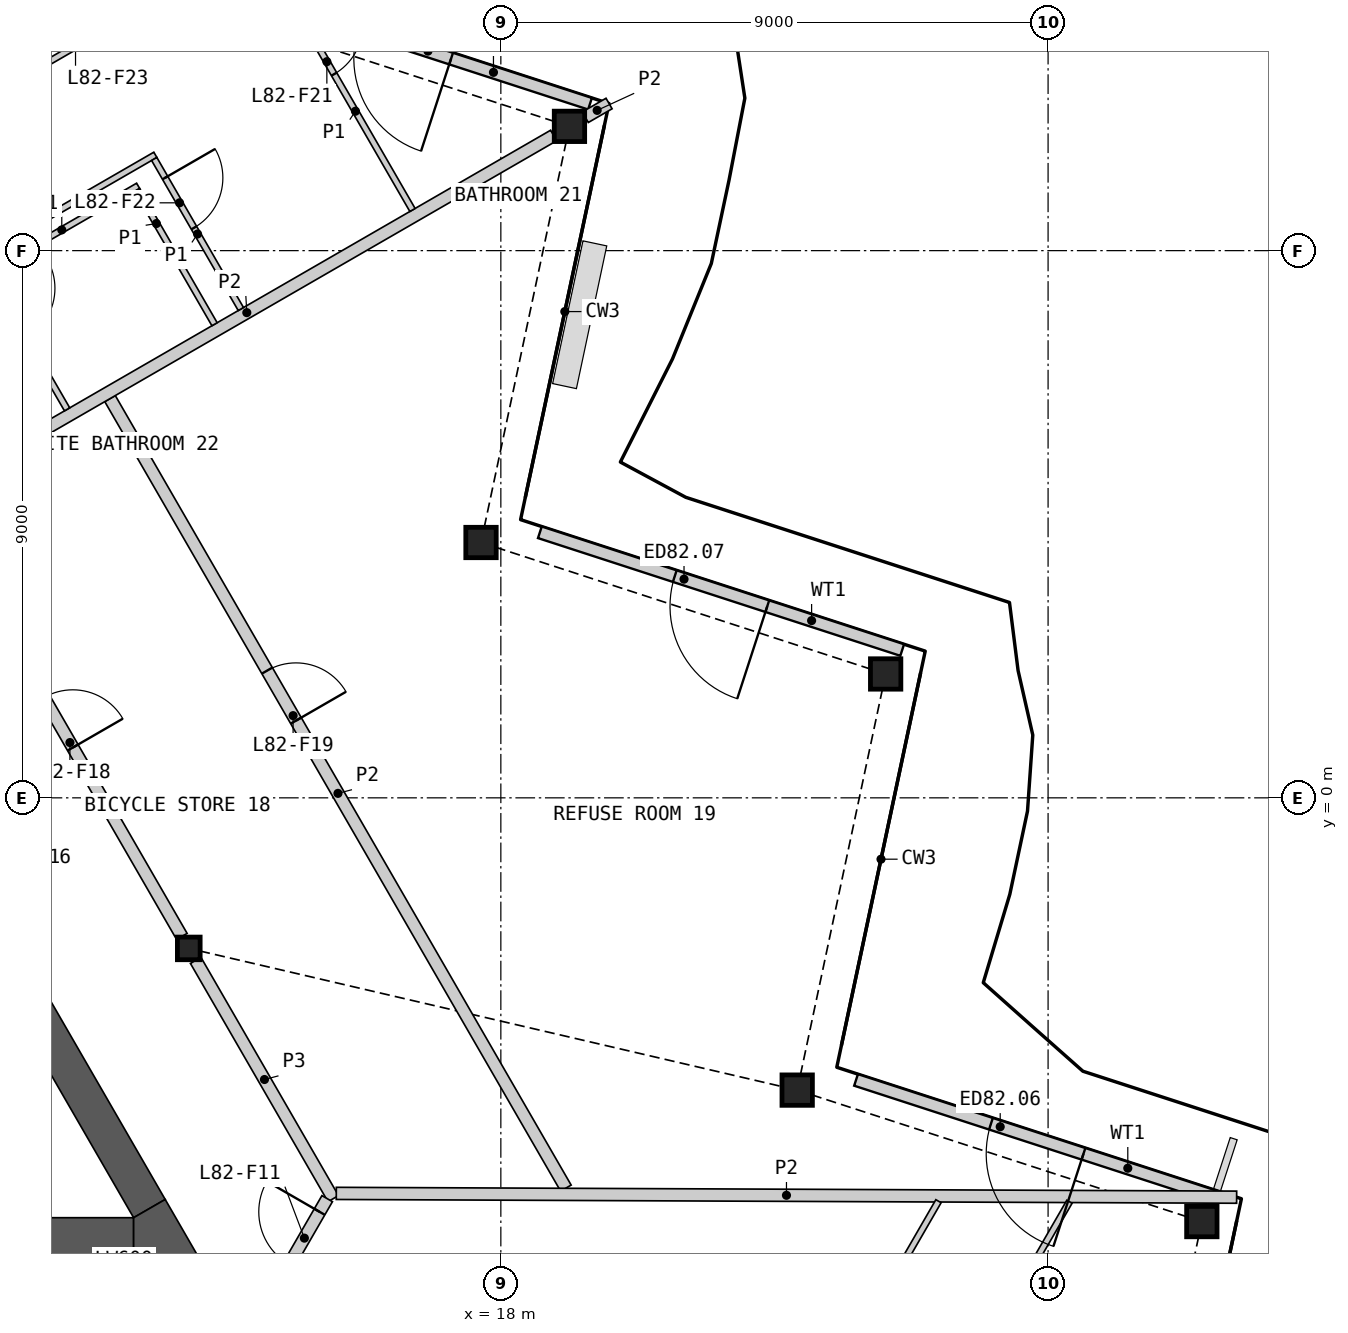
"""IFC4 building model, lengths in metres.
Left out: names, types, materials, properties, quantities, classifications, styles, units other than length and angle.
Written with IfcOpenShell. Run it as: python <this file> out.ifc"""

import sys

from ifc_helpers import new_model, si_unit, direction, frame, frame_2d, origin, origin_2d, place, context, subcontext, project, spatial, polyline, rectangle, hollow_rectangle, i_section, outline, extrude, element, fill, save


model = new_model("IFC4")
c1 = context("Model", 3, precision=1e-05, world=origin(), true_north=direction((0.0, 1.0)))
c2 = subcontext(c1, "Body", "Model", "MODEL_VIEW")
j1 = project(units=[si_unit("LENGTHUNIT", "METRE"), si_unit("PLANEANGLEUNIT", "RADIAN")], contexts=[c1])
p1 = place(None, origin())
s1 = spatial("IfcSite", under=j1, at=p1, CompositionType="ELEMENT")
p2 = place(p1, origin())
s2 = spatial("IfcBuilding", under=s1, at=p2, CompositionType="ELEMENT")
p3 = place(p2, frame((0.0, 0.0, 367.8)))
s3 = spatial("IfcBuildingStorey", under=s2, at=p3, CompositionType="ELEMENT", Elevation=367.8)
for number, where, z_axis, x_axis in (
    (1, (29.529, -6.969, 0.0), (0.0, 0.0, 1.0), (1.0, 0.0, 0.0)),
    (2, (22.874, -4.807, 0.0), (0.0, 0.0, 1.0), (1.0, 0.0, 0.0)),
    (3, (24.329, 2.037, 0.0), (0.0, 0.0, 1.0), (1.0, 0.0, 0.0)),
    (4, (17.674, 4.199, 0.0), (0.0, 0.0, 1.0), (1.0, 0.0, 0.0)),
    (5, (19.129, 11.044, 0.0), (0.0, 0.0, 1.0), (1.0, 0.0, 0.0)),
):
    element("IfcColumn", number, at=place(p3, frame(where, z_axis=z_axis, x_axis=x_axis)), inside=s3, PredefinedType="COLUMN", context=c2, shape_type="SweptSolid", body=[
        extrude(hollow_rectangle(XDim=0.5, YDim=0.5, WallThickness=0.03, at=origin_2d()), origin(), (0.0, 0.0, 1.0), 3.4),
    ])
p4 = place(p3, frame((12.868, -2.476, 0.0), z_axis=(0.0, 0.0, 1.0), x_axis=(1.0, 0.0, 0.0)))
e6 = element("IfcColumn", 6, at=p4, inside=s3, PredefinedType="COLUMN", context=c2, shape_type="SweptSolid", body=[
    extrude(i_section(OverallWidth=0.374, OverallDepth=0.372, WebThickness=0.016, FlangeThickness=0.026, at=origin_2d()), origin(), (0.0, 0.0, 1.0), 3.4),
])
p5 = place(p3, frame((29.801, -6.576, 0.0), z_axis=(0.0, 0.0, 1.0), x_axis=(-0.951060123915, 0.309005891041, 0.0)))
e7 = element("IfcWall", 7, at=p5, inside=s3, PredefinedType="SOLIDWALL", context=c2, shape_type="SweptSolid", body=[
    extrude(rectangle(XDim=6.265, YDim=0.2, at=frame_2d((3.133, 0.0))), origin(), (0.0, 0.0, 1.0), 2.634),
])
p6 = place(p5, frame((2.333, 0.0, 0.0)))
e8 = element("IfcOpeningElement", 8, at=p6, cuts=e7, PredefinedType="OPENING", context=c2, shape_type="SweptSolid", body=[
    extrude(rectangle(XDim=1.6, YDim=2.25, at=frame_2d((0.8, 1.125))), frame((0.0, 0.11, 0.0), z_axis=(0.0, -1.0, 0.0), x_axis=(1.0, 0.0, 0.0)), (0.0, 0.0, 1.0), 0.22),
])
p7 = place(p3, frame((24.601, 2.431, 0.0), z_axis=(0.0, 0.0, 1.0), x_axis=(-0.951060123915, 0.309005891041, 0.0)))
e9 = element("IfcWall", 9, at=p7, inside=s3, PredefinedType="SOLIDWALL", context=c2, shape_type="SweptSolid", body=[
    extrude(rectangle(XDim=6.265, YDim=0.2, at=frame_2d((3.133, 0.0))), origin(), (0.0, 0.0, 1.0), 2.634),
])
p8 = place(p7, frame((2.333, 0.0, 0.0)))
e10 = element("IfcOpeningElement", 10, at=p8, cuts=e9, PredefinedType="OPENING", context=c2, shape_type="SweptSolid", body=[
    extrude(rectangle(XDim=1.6, YDim=2.25, at=frame_2d((0.8, 1.125))), frame((0.0, 0.11, 0.0), z_axis=(0.0, -1.0, 0.0), x_axis=(1.0, 0.0, 0.0)), (0.0, 0.0, 1.0), 0.22),
])
p9 = place(p3, frame((19.467, 11.416, 0.0), z_axis=(0.0, 0.0, 1.0), x_axis=(-0.951057706878, 0.309013330114, 0.0)))
e11 = element("IfcWall", 11, at=p9, inside=s3, PredefinedType="SOLIDWALL", context=c2, shape_type="SweptSolid", body=[
    extrude(rectangle(XDim=6.678, YDim=0.2, at=frame_2d((3.339, 0.0))), origin(), (0.0, 0.0, 1.0), 2.634),
])
p10 = place(p9, frame((2.402, 0.0, 0.0)))
e12 = element("IfcOpeningElement", 12, at=p10, cuts=e11, PredefinedType="OPENING", context=c2, shape_type="SweptSolid", body=[
    extrude(rectangle(XDim=1.6, YDim=2.25, at=frame_2d((0.8, 1.125))), frame((0.0, 0.11, 0.0), z_axis=(0.0, -1.0, 0.0), x_axis=(1.0, 0.0, 0.0)), (0.0, 0.0, 1.0), 0.22),
])
p11 = place(p3, frame((-11.961, -7.206, 0.0), z_axis=(0.0, 0.0, 1.0), x_axis=(1.0, 0.0, 0.0)))
e13 = element("IfcWall", 13, at=p11, inside=s3, PredefinedType="SHEAR", context=c2, shape_type="SweptSolid", body=[
    extrude(rectangle(XDim=23.921, YDim=0.6, at=frame_2d((11.961, 0.0))), origin(), (0.0, 0.0, 1.0), 3.1),
])
p12 = place(p3, frame((12.221, -6.756, 0.0), z_axis=(0.0, 0.0, 1.0), x_axis=(-0.50000604952, 0.866021911064, 0.0)))
e14 = element("IfcWall", 14, at=p12, inside=s3, PredefinedType="SHEAR", context=c2, shape_type="SweptSolid", body=[
    extrude(rectangle(XDim=4.869, YDim=0.6, at=frame_2d((2.434, 0.0))), origin(), (0.0, 0.0, 1.0), 3.1),
])
p13 = place(p3, origin())
e15 = element("IfcWall", 15, at=p13, inside=s3, PredefinedType="SHEAR", context=c2, shape_type="SweptSolid", body=[
    extrude(outline(polyline([(11.961, -7.506), (11.961, -6.906), (12.48, -6.606), (13.0, -7.506), (11.961, -7.506)])), origin(), (0.0, 0.0, 1.0), 3.1),
])
p14 = place(p3, frame((8.692, 4.756, 0.0), z_axis=(0.0, 0.0, 1.0), x_axis=(0.500001682468, -0.866024432409, 0.0)))
e16 = element("IfcWall", 16, at=p14, inside=s3, PredefinedType="PARTITIONING", context=c2, shape_type="SweptSolid", body=[
    extrude(rectangle(XDim=8.124, YDim=0.2, at=frame_2d((4.062, 0.0))), origin(), (0.0, 0.0, 1.0), 3.1),
])
p15 = place(p14, frame((3.587, 0.0, 0.0)))
e17 = element("IfcOpeningElement", 17, at=p15, cuts=e16, PredefinedType="OPENING", context=c2, shape_type="SweptSolid", body=[
    extrude(rectangle(XDim=0.95, YDim=2.1, at=frame_2d((0.475, 1.05))), frame((0.0, 0.11, 0.0), z_axis=(0.0, -1.0, 0.0), x_axis=(1.0, 0.0, 0.0)), (0.0, 0.0, 1.0), 0.22),
])
p16 = place(p3, frame((12.981, -2.673, 0.0), z_axis=(0.0, 0.0, 1.0), x_axis=(0.499974648164, -0.866040040179, 0.0)))
e18 = element("IfcWall", 18, at=p16, inside=s3, PredefinedType="PARTITIONING", context=c2, shape_type="SweptSolid", body=[
    extrude(rectangle(XDim=4.525, YDim=0.2, at=frame_2d((2.263, 0.0))), origin(), (0.0, 0.0, 1.0), 3.1),
])
p17 = place(p3, frame((13.293, -9.797, 0.0), z_axis=(0.0, 0.0, 1.0), x_axis=(0.499977520935, 0.86603838169, 0.0)))
e19 = element("IfcWall", 19, at=p17, inside=s3, PredefinedType="PARTITIONING", context=c2, shape_type="SweptSolid", body=[
    extrude(rectangle(XDim=3.701, YDim=0.2, at=frame_2d((1.851, 0.0))), origin(), (0.0, 0.0, 1.0), 3.1),
])
p18 = place(p17, frame((2.451, 0.0, 0.0)))
e20 = element("IfcOpeningElement", 20, at=p18, cuts=e19, PredefinedType="OPENING", context=c2, shape_type="SweptSolid", body=[
    extrude(rectangle(XDim=1.0, YDim=2.1, at=frame_2d((0.5, 1.05))), frame((0.0, 0.11, 0.0), z_axis=(0.0, -1.0, 0.0), x_axis=(1.0, 0.0, 0.0)), (0.0, 0.0, 1.0), 0.22),
])
p19 = place(p3, frame((11.573, 6.566, 0.0), z_axis=(0.0, 0.0, 1.0), x_axis=(0.499993542657, -0.866029131901, 0.0)))
e21 = element("IfcWall", 21, at=p19, inside=s3, PredefinedType="PARTITIONING", context=c2, shape_type="SweptSolid", body=[
    extrude(rectangle(XDim=14.994, YDim=0.2, at=frame_2d((7.497, 0.0))), origin(), (0.0, 0.0, 1.0), 2.33),
])
p20 = place(p19, frame((5.166, 0.0, 0.0)))
e22 = element("IfcOpeningElement", 22, at=p20, cuts=e21, PredefinedType="OPENING", context=c2, shape_type="SweptSolid", body=[
    extrude(rectangle(XDim=0.95, YDim=2.1, at=frame_2d((0.475, 1.05))), frame((0.0, 0.11, 0.0), z_axis=(0.0, -1.0, 0.0), x_axis=(1.0, 0.0, 0.0)), (0.0, 0.0, 1.0), 0.22),
])
p21 = place(p3, frame((15.294, -6.506, 0.0), z_axis=(0.0, 0.0, 1.0), x_axis=(0.99999116141, -0.004204414611, 0.0)))
e23 = element("IfcWall", 23, at=p21, inside=s3, PredefinedType="PARTITIONING", context=c2, shape_type="SweptSolid", body=[
    extrude(rectangle(XDim=14.807, YDim=0.2, at=frame_2d((7.404, 0.0))), origin(), (0.0, 0.0, 1.0), 2.33),
])
p22 = place(p3, frame((8.775, 5.066, 0.0), z_axis=(0.0, 0.0, 1.0), x_axis=(0.866023724155, 0.500002909193, 0.0)))
e24 = element("IfcWall", 24, at=p22, inside=s3, PredefinedType="PARTITIONING", context=c2, shape_type="SweptSolid", body=[
    extrude(rectangle(XDim=11.655, YDim=0.2, at=frame_2d((5.827, 0.0))), origin(), (0.0, 0.0, 1.0), 2.33),
])
p23 = place(p3, frame((19.389, 11.194, 0.0), z_axis=(0.0, 0.0, 1.0), x_axis=(0.866104518135, 0.499862944882, 0.0)))
e25 = element("IfcWall", 25, at=p23, inside=s3, PredefinedType="PARTITIONING", context=c2, shape_type="SweptSolid", body=[
    extrude(rectangle(XDim=0.451, YDim=0.2, at=frame_2d((0.226, 0.0))), origin(), (0.0, 0.0, 1.0), 2.33),
])
p24 = place(p3, frame((23.415, -13.461, 0.0), z_axis=(0.0, 0.0, 1.0), x_axis=(0.500011483804, 0.866018773506, 0.0)))
e26 = element("IfcWall", 26, at=p24, inside=s3, PredefinedType="PARTITIONING", context=c2, shape_type="SweptSolid", body=[
    extrude(rectangle(XDim=7.872, YDim=0.1, at=frame_2d((3.936, 0.0))), origin(), (0.0, 0.0, 1.0), 2.33),
])
p25 = place(p24, frame((3.461, 0.0, 0.0)))
e27 = element("IfcOpeningElement", 27, at=p25, cuts=e26, PredefinedType="OPENING", context=c2, shape_type="SweptSolid", body=[
    extrude(rectangle(XDim=0.95, YDim=2.1, at=frame_2d((0.475, 1.05))), frame((0.0, 0.06, 0.0), z_axis=(0.0, -1.0, 0.0), x_axis=(1.0, 0.0, 0.0)), (0.0, 0.0, 1.0), 0.12),
])
p26 = place(p3, frame((6.065, 9.506, 0.0), z_axis=(0.0, 0.0, 1.0), x_axis=(0.866018949465, 0.500011179042, 0.0)))
e28 = element("IfcWall", 28, at=p26, inside=s3, PredefinedType="PARTITIONING", context=c2, shape_type="SweptSolid", body=[
    extrude(rectangle(XDim=7.1, YDim=0.1, at=frame_2d((3.55, 0.0))), origin(), (0.0, 0.0, 1.0), 2.33),
])
p27 = place(p26, frame((4.992, 0.0, 0.0)))
e29 = element("IfcOpeningElement", 29, at=p27, cuts=e28, PredefinedType="OPENING", context=c2, shape_type="SweptSolid", body=[
    extrude(rectangle(XDim=0.95, YDim=2.1, at=frame_2d((0.475, 1.05))), frame((0.0, 0.06, 0.0), z_axis=(0.0, -1.0, 0.0), x_axis=(1.0, 0.0, 0.0)), (0.0, 0.0, 1.0), 0.12),
])
p28 = place(p3, frame((21.796, -12.526, 0.0), z_axis=(0.0, 0.0, 1.0), x_axis=(0.499994777381, 0.866028419044, 0.0)))
e30 = element("IfcWall", 30, at=p28, inside=s3, PredefinedType="PARTITIONING", context=c2, shape_type="SweptSolid", body=[
    extrude(rectangle(XDim=6.803, YDim=0.1, at=frame_2d((3.402, 0.0))), origin(), (0.0, 0.0, 1.0), 2.33),
])
p29 = place(p28, frame((1.361, 0.0, 0.0)))
e31 = element("IfcOpeningElement", 31, at=p29, cuts=e30, PredefinedType="OPENING", context=c2, shape_type="SweptSolid", body=[
    extrude(rectangle(XDim=0.95, YDim=2.1, at=frame_2d((0.475, 1.05))), frame((0.0, 0.06, 0.0), z_axis=(0.0, -1.0, 0.0), x_axis=(1.0, 0.0, 0.0)), (0.0, 0.0, 1.0), 0.12),
])
p30 = place(p3, frame((7.165, 7.601, 0.0), z_axis=(0.0, 0.0, 1.0), x_axis=(0.866017493347, 0.500013701029, 0.0)))
e32 = element("IfcWall", 32, at=p30, inside=s3, PredefinedType="PARTITIONING", context=c2, shape_type="SweptSolid", body=[
    extrude(rectangle(XDim=5.95, YDim=0.1, at=frame_2d((2.975, 0.0))), origin(), (0.0, 0.0, 1.0), 2.33),
])
p31 = place(p3, frame((14.671, 12.918, 0.0), z_axis=(0.0, 0.0, 1.0), x_axis=(0.499981580887, -0.866036037803, 0.0)))
e33 = element("IfcWall", 33, at=p31, inside=s3, PredefinedType="PARTITIONING", context=c2, shape_type="SweptSolid", body=[
    extrude(rectangle(XDim=3.752, YDim=0.1, at=frame_2d((1.876, 0.0))), origin(), (0.0, 0.0, 1.0), 2.33),
])
p32 = place(p31, frame((0.222, 0.0, 0.0)))
e34 = element("IfcOpeningElement", 34, at=p32, cuts=e33, PredefinedType="OPENING", context=c2, shape_type="SweptSolid", body=[
    extrude(rectangle(XDim=0.95, YDim=2.1, at=frame_2d((0.475, 1.05))), frame((0.0, 0.06, 0.0), z_axis=(0.0, -1.0, 0.0), x_axis=(1.0, 0.0, 0.0)), (0.0, 0.0, 1.0), 0.12),
])
p33 = place(p3, frame((12.3, 10.508, 0.0), z_axis=(0.0, 0.0, 1.0), x_axis=(0.499999279071, -0.866025820012, 0.0)))
e35 = element("IfcWall", 35, at=p33, inside=s3, PredefinedType="PARTITIONING", context=c2, shape_type="SweptSolid", body=[
    extrude(rectangle(XDim=2.85, YDim=0.1, at=frame_2d((1.425, 0.0))), origin(), (0.0, 0.0, 1.0), 2.33),
])
p34 = place(p33, frame((0.358, 0.0, 0.0)))
e36 = element("IfcOpeningElement", 36, at=p34, cuts=e35, PredefinedType="OPENING", context=c2, shape_type="SweptSolid", body=[
    extrude(rectangle(XDim=0.95, YDim=2.1, at=frame_2d((0.475, 1.05))), frame((0.0, 0.06, 0.0), z_axis=(0.0, -1.0, 0.0), x_axis=(1.0, 0.0, 0.0)), (0.0, 0.0, 1.0), 0.12),
])
p35 = place(p3, frame((9.523, 8.616, 0.0), z_axis=(0.0, 0.0, 1.0), x_axis=(0.866032775405, 0.499987231761, 0.0)))
e37 = element("IfcWall", 37, at=p35, inside=s3, PredefinedType="PARTITIONING", context=c2, shape_type="SweptSolid", body=[
    extrude(rectangle(XDim=2.9, YDim=0.1, at=frame_2d((1.45, 0.0))), origin(), (0.0, 0.0, 1.0), 2.33),
])
p36 = place(p3, frame((12.017, 9.998, 0.0), z_axis=(0.0, 0.0, 1.0), x_axis=(0.499948979701, -0.866054858364, 0.0)))
e38 = element("IfcWall", 38, at=p36, inside=s3, PredefinedType="PARTITIONING", context=c2, shape_type="SweptSolid", body=[
    extrude(rectangle(XDim=2.55, YDim=0.1, at=frame_2d((1.275, 0.0))), origin(), (0.0, 0.0, 1.0), 2.33),
])
p37 = place(p3, frame((9.592, 8.598, 0.0), z_axis=(0.0, 0.0, 1.0), x_axis=(0.499990435942, -0.866030925526, 0.0)))
e39 = element("IfcWall", 39, at=p37, inside=s3, PredefinedType="PARTITIONING", context=c2, shape_type="SweptSolid", body=[
    extrude(rectangle(XDim=2.55, YDim=0.1, at=frame_2d((1.275, 0.0))), origin(), (0.0, 0.0, 1.0), 2.33),
])
p38 = place(p37, frame((0.25, 0.0, 0.0)))
e40 = element("IfcOpeningElement", 40, at=p38, cuts=e39, PredefinedType="OPENING", context=c2, shape_type="SweptSolid", body=[
    extrude(rectangle(XDim=0.95, YDim=2.1, at=frame_2d((0.475, 1.05))), frame((0.0, 0.06, 0.0), z_axis=(0.0, -1.0, 0.0), x_axis=(1.0, 0.0, 0.0)), (0.0, 0.0, 1.0), 0.12),
])
p39 = place(p6, origin())
e41 = element("IfcDoor", 41, at=p39, inside=s3, OperationType="DOUBLE_DOOR_SINGLE_SWING", PredefinedType="DOOR", context=c2, shape_type="SweptSolid", body=[
    extrude(rectangle(XDim=1.6, YDim=2.25, at=frame_2d((0.8, 1.125))), frame((0.0, 0.025, 0.0), z_axis=(0.0, -1.0, 0.0), x_axis=(1.0, 0.0, 0.0)), (0.0, 0.0, 1.0), 0.05),
])
fill(e8, e41)
p40 = place(p8, origin())
e42 = element("IfcDoor", 42, at=p40, inside=s3, OperationType="DOUBLE_DOOR_SINGLE_SWING", PredefinedType="DOOR", context=c2, shape_type="SweptSolid", body=[
    extrude(rectangle(XDim=1.6, YDim=2.25, at=frame_2d((0.8, 1.125))), frame((0.0, 0.025, 0.0), z_axis=(0.0, -1.0, 0.0), x_axis=(1.0, 0.0, 0.0)), (0.0, 0.0, 1.0), 0.05),
])
fill(e10, e42)
p41 = place(p10, origin())
e43 = element("IfcDoor", 43, at=p41, inside=s3, OperationType="DOUBLE_DOOR_SINGLE_SWING", PredefinedType="DOOR", context=c2, shape_type="SweptSolid", body=[
    extrude(rectangle(XDim=1.6, YDim=2.25, at=frame_2d((0.8, 1.125))), frame((0.0, 0.025, 0.0), z_axis=(0.0, -1.0, 0.0), x_axis=(1.0, 0.0, 0.0)), (0.0, 0.0, 1.0), 0.05),
])
fill(e12, e43)
p42 = place(p18, origin())
e44 = element("IfcDoor", 44, at=p42, inside=s3, OperationType="SINGLE_SWING_RIGHT", PredefinedType="DOOR", context=c2, shape_type="SweptSolid", body=[
    extrude(rectangle(XDim=1.0, YDim=2.1, at=frame_2d((0.5, 1.05))), frame((0.0, 0.025, 0.0), z_axis=(0.0, -1.0, 0.0), x_axis=(1.0, 0.0, 0.0)), (0.0, 0.0, 1.0), 0.05),
])
fill(e20, e44)
p43 = place(p15, origin())
e45 = element("IfcDoor", 45, at=p43, inside=s3, OperationType="SINGLE_SWING_RIGHT", PredefinedType="DOOR", context=c2, shape_type="SweptSolid", body=[
    extrude(rectangle(XDim=0.95, YDim=2.1, at=frame_2d((0.475, 1.05))), frame((0.0, 0.025, 0.0), z_axis=(0.0, -1.0, 0.0), x_axis=(1.0, 0.0, 0.0)), (0.0, 0.0, 1.0), 0.05),
])
fill(e17, e45)
p44 = place(p20, origin())
e46 = element("IfcDoor", 46, at=p44, inside=s3, OperationType="SINGLE_SWING_RIGHT", PredefinedType="DOOR", context=c2, shape_type="SweptSolid", body=[
    extrude(rectangle(XDim=0.95, YDim=2.1, at=frame_2d((0.475, 1.05))), frame((0.0, 0.025, 0.0), z_axis=(0.0, -1.0, 0.0), x_axis=(1.0, 0.0, 0.0)), (0.0, 0.0, 1.0), 0.05),
])
fill(e22, e46)
p45 = place(p32, origin())
e47 = element("IfcDoor", 47, at=p45, inside=s3, OperationType="SINGLE_SWING_LEFT", PredefinedType="DOOR", context=c2, shape_type="SweptSolid", body=[
    extrude(rectangle(XDim=0.95, YDim=2.1, at=frame_2d((0.475, 1.05))), frame((0.0, 0.025, 0.0), z_axis=(0.0, -1.0, 0.0), x_axis=(1.0, 0.0, 0.0)), (0.0, 0.0, 1.0), 0.05),
])
fill(e34, e47)
p46 = place(p34, origin())
e48 = element("IfcDoor", 48, at=p46, inside=s3, OperationType="SINGLE_SWING_LEFT", PredefinedType="DOOR", context=c2, shape_type="SweptSolid", body=[
    extrude(rectangle(XDim=0.95, YDim=2.1, at=frame_2d((0.475, 1.05))), frame((0.0, 0.025, 0.0), z_axis=(0.0, -1.0, 0.0), x_axis=(1.0, 0.0, 0.0)), (0.0, 0.0, 1.0), 0.05),
])
fill(e36, e48)
p47 = place(p27, origin())
e49 = element("IfcDoor", 49, at=p47, inside=s3, OperationType="SINGLE_SWING_LEFT", PredefinedType="DOOR", context=c2, shape_type="SweptSolid", body=[
    extrude(rectangle(XDim=0.95, YDim=2.1, at=frame_2d((0.475, 1.05))), frame((0.0, 0.025, 0.0), z_axis=(0.0, -1.0, 0.0), x_axis=(1.0, 0.0, 0.0)), (0.0, 0.0, 1.0), 0.05),
])
fill(e29, e49)
save(model, sys.argv[1])
